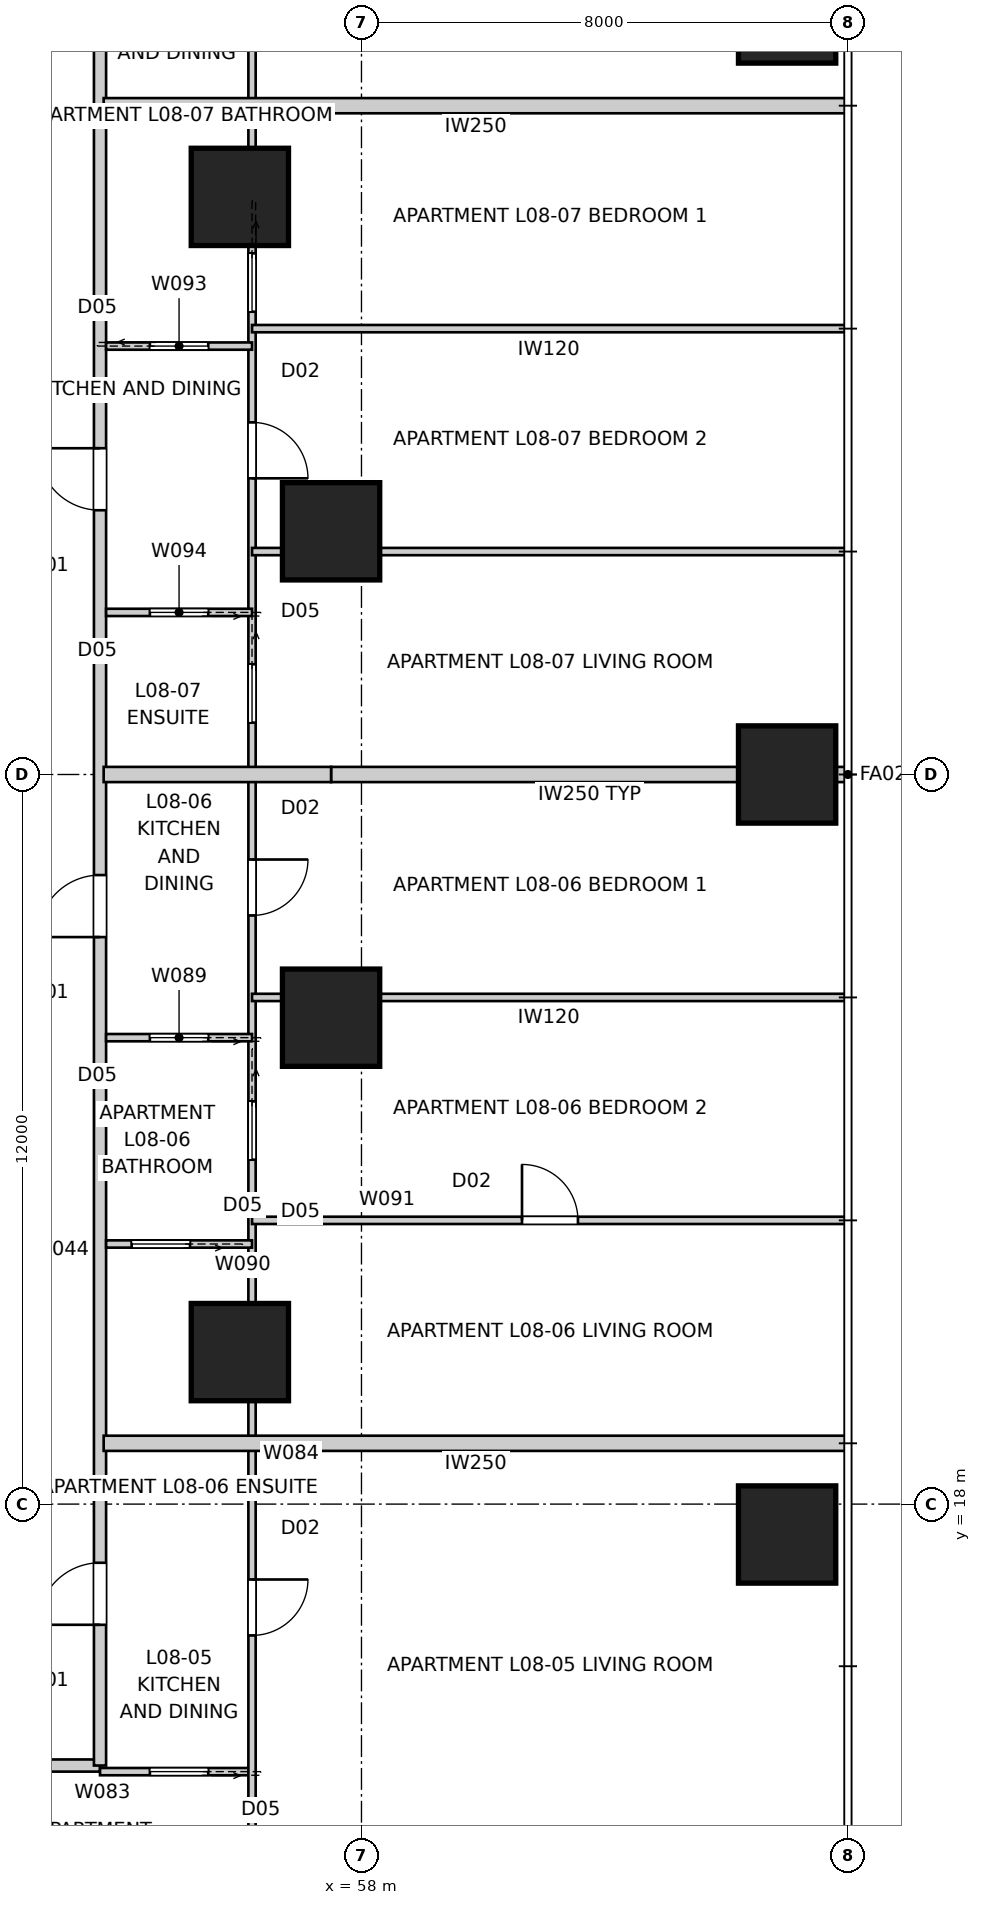
"""IFC4 building model, lengths in metres.
Left out: names, types, materials, properties, quantities, classifications, styles, units other than length and angle.
Written with IfcOpenShell. Run it as: python <this file> out.ifc"""

import sys

from ifc_helpers import new_model, si_unit, direction, frame, frame_2d, origin, origin_2d, place, context, subcontext, project, spatial, rectangle, extrude, element, fill, save


model = new_model("IFC4")
c1 = context("Model", 3, precision=1e-05, world=origin(), true_north=direction((0.0, 1.0)))
c2 = subcontext(c1, "Body", "Model", "MODEL_VIEW")
j1 = project(units=[si_unit("LENGTHUNIT", "METRE"), si_unit("PLANEANGLEUNIT", "RADIAN")], contexts=[c1])
p1 = place(None, origin())
s1 = spatial("IfcSite", under=j1, at=p1, CompositionType="ELEMENT")
p2 = place(p1, origin())
s2 = spatial("IfcBuilding", under=s1, at=p2, CompositionType="ELEMENT")
p3 = place(p2, frame((0.0, 0.0, 32.0)))
s3 = spatial("IfcBuildingStorey", under=s2, at=p3, CompositionType="ELEMENT", Elevation=32.0)
for number, where, z_axis, x_axis in (
    (1, (65.0, 17.5, 0.0), (0.0, 0.0, 1.0), (1.0, 0.0, 0.0)),
    (2, (65.0, 30.0, 0.0), (0.0, 0.0, 1.0), (1.0, 0.0, 0.0)),
    (3, (65.0, 42.5, 0.0), (0.0, 0.0, 1.0), (1.0, 0.0, 0.0)),
    (4, (57.5, 26.0, 0.0), (0.0, 0.0, 1.0), (1.0, 0.0, 0.0)),
    (5, (57.5, 34.0, 0.0), (0.0, 0.0, 1.0), (1.0, 0.0, 0.0)),
    (6, (56.0, 39.5, 0.0), (0.0, 0.0, 1.0), (1.0, 0.0, 0.0)),
    (7, (56.0, 20.5, 0.0), (0.0, 0.0, 1.0), (1.0, 0.0, 0.0)),
):
    element("IfcColumn", number, at=place(p3, frame(where, z_axis=z_axis, x_axis=x_axis)), inside=s3, PredefinedType="COLUMN", context=c2, shape_type="SweptSolid", body=[
        extrude(rectangle(XDim=1.6, YDim=1.6, at=origin_2d()), origin(), (0.0, 0.0, 1.0), 3.4),
    ])
p4 = place(p3, frame((49.242, 13.7, 0.0), z_axis=(0.0, 0.0, 1.0), x_axis=(1.0, 0.0, 0.0)))
e8 = element("IfcWall", 8, at=p4, inside=s3, PredefinedType="PARTITIONING", context=c2, shape_type="SweptSolid", body=[
    extrude(rectangle(XDim=4.458, YDim=0.2, at=frame_2d((2.229, 0.0))), origin(), (0.0, 0.0, 1.0), 3.25),
])
p5 = place(p3, frame((53.7, 13.7, 0.0), z_axis=(0.0, 0.0, 1.0), x_axis=(0.0, 1.0, 0.0)))
e9 = element("IfcWall", 9, at=p5, inside=s3, PredefinedType="PARTITIONING", context=c2, shape_type="SweptSolid", body=[
    extrude(rectangle(XDim=32.6, YDim=0.2, at=frame_2d((16.3, 0.0))), origin(), (0.0, 0.0, 1.0), 3.25),
])
p6 = place(p5, frame((2.315, 0.0, 0.0)))
e10 = element("IfcOpeningElement", 10, at=p6, cuts=e9, PredefinedType="OPENING", context=c2, shape_type="SweptSolid", body=[
    extrude(rectangle(XDim=1.02, YDim=2.34, at=frame_2d((0.51, 1.17))), frame((0.0, 0.11, 0.0), z_axis=(0.0, -1.0, 0.0), x_axis=(1.0, 0.0, 0.0)), (0.0, 0.0, 1.0), 0.22),
])
p7 = place(p5, frame((29.265, 0.0, 0.0)))
e11 = element("IfcOpeningElement", 11, at=p7, cuts=e9, PredefinedType="OPENING", context=c2, shape_type="SweptSolid", body=[
    extrude(rectangle(XDim=1.02, YDim=2.34, at=frame_2d((0.51, 1.17))), frame((0.0, 0.11, 0.0), z_axis=(0.0, -1.0, 0.0), x_axis=(1.0, 0.0, 0.0)), (0.0, 0.0, 1.0), 0.22),
])
p8 = place(p5, frame((20.646, 0.0, 0.0)))
e12 = element("IfcOpeningElement", 12, at=p8, cuts=e9, PredefinedType="OPENING", context=c2, shape_type="SweptSolid", body=[
    extrude(rectangle(XDim=1.02, YDim=2.34, at=frame_2d((0.51, 1.17))), frame((0.0, 0.11, 0.0), z_axis=(0.0, -1.0, 0.0), x_axis=(1.0, 0.0, 0.0)), (0.0, 0.0, 1.0), 0.22),
])
p9 = place(p5, frame((13.626, 0.0, 0.0)))
e13 = element("IfcOpeningElement", 13, at=p9, cuts=e9, PredefinedType="OPENING", context=c2, shape_type="SweptSolid", body=[
    extrude(rectangle(XDim=1.02, YDim=2.34, at=frame_2d((0.51, 1.17))), frame((0.0, 0.11, 0.0), z_axis=(0.0, -1.0, 0.0), x_axis=(1.0, 0.0, 0.0)), (0.0, 0.0, 1.0), 0.22),
])
for number, where, z_axis, x_axis in (
    (14, (66.0, 19.0, 0.0), (0.0, 0.0, 1.0), (-1.0, 0.0, 0.0)),
    (15, (66.0, 41.0, 0.0), (0.0, 0.0, 1.0), (-1.0, 0.0, 0.0)),
):
    element("IfcWall", number, at=place(p3, frame(where, z_axis=z_axis, x_axis=x_axis)), inside=s3, PredefinedType="PARTITIONING", context=c2, shape_type="SweptSolid", body=[
        extrude(rectangle(XDim=12.24, YDim=0.25, at=frame_2d((6.12, 0.0))), origin(), (0.0, 0.0, 1.0), 3.25),
    ])
p10 = place(p3, frame((66.0, 30.0, 0.0), z_axis=(0.0, 0.0, 1.0), x_axis=(-1.0, 0.0, 0.0)))
e16 = element("IfcWall", 16, at=p10, inside=s3, PredefinedType="PARTITIONING", context=c2, shape_type="SweptSolid", body=[
    extrude(rectangle(XDim=8.5, YDim=0.25, at=frame_2d((4.25, 0.0))), origin(), (0.0, 0.0, 1.0), 3.25),
])
p11 = place(p3, frame((57.5, 30.0, 0.0), z_axis=(0.0, 0.0, 1.0), x_axis=(-1.0, 0.0, 0.0)))
e17 = element("IfcWall", 17, at=p11, inside=s3, PredefinedType="PARTITIONING", context=c2, shape_type="SweptSolid", body=[
    extrude(rectangle(XDim=3.74, YDim=0.25, at=frame_2d((1.87, 0.0))), origin(), (0.0, 0.0, 1.0), 2.796),
])
p12 = place(p3, frame((56.2, 13.6, 0.0), z_axis=(0.0, 0.0, 1.0), x_axis=(-1.0, 0.0, 0.0)))
e18 = element("IfcWall", 18, at=p12, inside=s3, PredefinedType="PARTITIONING", context=c2, shape_type="SweptSolid", body=[
    extrude(rectangle(XDim=2.5, YDim=0.12, at=frame_2d((1.25, 0.0))), origin(), (0.0, 0.0, 1.0), 3.25),
])
p13 = place(p12, frame((0.72, 0.0, 0.0)))
e19 = element("IfcOpeningElement", 19, at=p13, cuts=e18, PredefinedType="OPENING", context=c2, shape_type="SweptSolid", body=[
    extrude(rectangle(XDim=0.96, YDim=2.1, at=frame_2d((0.48, 1.05))), frame((0.0, 0.07, 0.0), z_axis=(0.0, -1.0, 0.0), x_axis=(1.0, 0.0, 0.0)), (0.0, 0.0, 1.0), 0.14),
])
p14 = place(p3, frame((56.2, 48.333, 0.0), z_axis=(0.0, 0.0, 1.0), x_axis=(0.0, -1.0, 0.0)))
e20 = element("IfcWall", 20, at=p14, inside=s3, PredefinedType="PARTITIONING", context=c2, shape_type="SweptSolid", body=[
    extrude(rectangle(XDim=36.667, YDim=0.12, at=frame_2d((18.333, 0.0))), origin(), (0.0, 0.0, 1.0), 2.55),
])
p15 = place(p14, frame((31.573, 0.0, 0.0)))
e21 = element("IfcOpeningElement", 21, at=p15, cuts=e20, PredefinedType="OPENING", context=c2, shape_type="SweptSolid", body=[
    extrude(rectangle(XDim=0.92, YDim=2.34, at=frame_2d((0.46, 1.17))), frame((0.0, 0.07, 0.0), z_axis=(0.0, -1.0, 0.0), x_axis=(1.0, 0.0, 0.0)), (0.0, 0.0, 1.0), 0.14),
])
p16 = place(p14, frame((3.207, 0.0, 0.0)))
e22 = element("IfcOpeningElement", 22, at=p16, cuts=e20, PredefinedType="OPENING", context=c2, shape_type="SweptSolid", body=[
    extrude(rectangle(XDim=0.92, YDim=2.34, at=frame_2d((0.46, 1.17))), frame((0.0, 0.07, 0.0), z_axis=(0.0, -1.0, 0.0), x_axis=(1.0, 0.0, 0.0)), (0.0, 0.0, 1.0), 0.14),
])
p17 = place(p14, frame((12.542, 0.0, 0.0)))
e23 = element("IfcOpeningElement", 23, at=p17, cuts=e20, PredefinedType="OPENING", context=c2, shape_type="SweptSolid", body=[
    extrude(rectangle(XDim=0.92, YDim=2.34, at=frame_2d((0.46, 1.17))), frame((0.0, 0.07, 0.0), z_axis=(0.0, -1.0, 0.0), x_axis=(1.0, 0.0, 0.0)), (0.0, 0.0, 1.0), 0.14),
])
p18 = place(p14, frame((19.732, 0.0, 0.0)))
e24 = element("IfcOpeningElement", 24, at=p18, cuts=e20, PredefinedType="OPENING", context=c2, shape_type="SweptSolid", body=[
    extrude(rectangle(XDim=0.92, YDim=2.34, at=frame_2d((0.46, 1.17))), frame((0.0, 0.07, 0.0), z_axis=(0.0, -1.0, 0.0), x_axis=(1.0, 0.0, 0.0)), (0.0, 0.0, 1.0), 0.14),
])
p19 = place(p14, frame((9.762, 0.0, 0.0)))
e25 = element("IfcOpeningElement", 25, at=p19, cuts=e20, PredefinedType="OPENING", context=c2, shape_type="SweptSolid", body=[
    extrude(rectangle(XDim=0.96, YDim=2.1, at=frame_2d((0.48, 1.05))), frame((0.0, 0.07, 0.0), z_axis=(0.0, -1.0, 0.0), x_axis=(1.0, 0.0, 0.0)), (0.0, 0.0, 1.0), 0.14),
])
p20 = place(p14, frame((16.52, 0.0, 0.0)))
e26 = element("IfcOpeningElement", 26, at=p20, cuts=e20, PredefinedType="OPENING", context=c2, shape_type="SweptSolid", body=[
    extrude(rectangle(XDim=0.96, YDim=2.1, at=frame_2d((0.48, 1.05))), frame((0.0, 0.07, 0.0), z_axis=(0.0, -1.0, 0.0), x_axis=(1.0, 0.0, 0.0)), (0.0, 0.0, 1.0), 0.14),
])
p21 = place(p14, frame((23.709, 0.0, 0.0)))
e27 = element("IfcOpeningElement", 27, at=p21, cuts=e20, PredefinedType="OPENING", context=c2, shape_type="SweptSolid", body=[
    extrude(rectangle(XDim=0.96, YDim=2.1, at=frame_2d((0.48, 1.05))), frame((0.0, 0.07, 0.0), z_axis=(0.0, -1.0, 0.0), x_axis=(1.0, 0.0, 0.0)), (0.0, 0.0, 1.0), 0.14),
])
p22 = place(p3, frame((56.2, 25.672, 0.0), z_axis=(0.0, 0.0, 1.0), x_axis=(-1.0, 0.0, 0.0)))
e28 = element("IfcWall", 28, at=p22, inside=s3, PredefinedType="PARTITIONING", context=c2, shape_type="SweptSolid", body=[
    extrude(rectangle(XDim=2.4, YDim=0.12, at=frame_2d((1.2, 0.0))), origin(), (0.0, 0.0, 1.0), 3.25),
])
p23 = place(p22, frame((0.72, 0.0, 0.0)))
e29 = element("IfcOpeningElement", 29, at=p23, cuts=e28, PredefinedType="OPENING", context=c2, shape_type="SweptSolid", body=[
    extrude(rectangle(XDim=0.96, YDim=2.1, at=frame_2d((0.48, 1.05))), frame((0.0, 0.07, 0.0), z_axis=(0.0, -1.0, 0.0), x_axis=(1.0, 0.0, 0.0)), (0.0, 0.0, 1.0), 0.14),
])
p24 = place(p3, frame((56.2, 22.278, 0.0), z_axis=(0.0, 0.0, 1.0), x_axis=(-1.0, 0.0, 0.0)))
e30 = element("IfcWall", 30, at=p24, inside=s3, PredefinedType="PARTITIONING", context=c2, shape_type="SweptSolid", body=[
    extrude(rectangle(XDim=2.4, YDim=0.12, at=frame_2d((1.2, 0.0))), origin(), (0.0, 0.0, 1.0), 3.25),
])
p25 = place(p24, frame((1.02, 0.0, 0.0)))
e31 = element("IfcOpeningElement", 31, at=p25, cuts=e30, PredefinedType="OPENING", context=c2, shape_type="SweptSolid", body=[
    extrude(rectangle(XDim=0.96, YDim=2.1, at=frame_2d((0.48, 1.05))), frame((0.0, 0.07, 0.0), z_axis=(0.0, -1.0, 0.0), x_axis=(1.0, 0.0, 0.0)), (0.0, 0.0, 1.0), 0.14),
])
p26 = place(p3, frame((56.2, 22.667, 0.0), z_axis=(0.0, 0.0, 1.0), x_axis=(1.0, 0.0, 0.0)))
e32 = element("IfcWall", 32, at=p26, inside=s3, PredefinedType="PARTITIONING", context=c2, shape_type="SweptSolid", body=[
    extrude(rectangle(XDim=9.76, YDim=0.12, at=frame_2d((4.88, 0.0))), origin(), (0.0, 0.0, 1.0), 3.25),
])
p27 = place(p26, frame((4.44, 0.0, 0.0)))
e33 = element("IfcOpeningElement", 33, at=p27, cuts=e32, PredefinedType="OPENING", context=c2, shape_type="SweptSolid", body=[
    extrude(rectangle(XDim=0.92, YDim=2.34, at=frame_2d((0.46, 1.17))), frame((0.0, 0.07, 0.0), z_axis=(0.0, -1.0, 0.0), x_axis=(1.0, 0.0, 0.0)), (0.0, 0.0, 1.0), 0.14),
])
p28 = place(p3, frame((65.96, 26.333, 0.0), z_axis=(0.0, 0.0, 1.0), x_axis=(-1.0, 0.0, 0.0)))
e34 = element("IfcWall", 34, at=p28, inside=s3, PredefinedType="PARTITIONING", context=c2, shape_type="SweptSolid", body=[
    extrude(rectangle(XDim=9.76, YDim=0.12, at=frame_2d((4.88, 0.0))), origin(), (0.0, 0.0, 1.0), 3.25),
])
p29 = place(p3, frame((53.8, 37.046, 0.0), z_axis=(0.0, 0.0, 1.0), x_axis=(1.0, 0.0, 0.0)))
e35 = element("IfcWall", 35, at=p29, inside=s3, PredefinedType="PARTITIONING", context=c2, shape_type="SweptSolid", body=[
    extrude(rectangle(XDim=2.4, YDim=0.12, at=frame_2d((1.2, 0.0))), origin(), (0.0, 0.0, 1.0), 3.25),
])
p30 = place(p29, frame((0.72, 0.0, 0.0)))
e36 = element("IfcOpeningElement", 36, at=p30, cuts=e35, PredefinedType="OPENING", context=c2, shape_type="SweptSolid", body=[
    extrude(rectangle(XDim=0.96, YDim=2.1, at=frame_2d((0.48, 1.05))), frame((0.0, 0.07, 0.0), z_axis=(0.0, -1.0, 0.0), x_axis=(1.0, 0.0, 0.0)), (0.0, 0.0, 1.0), 0.14),
])
p31 = place(p3, frame((56.2, 32.666, 0.0), z_axis=(0.0, 0.0, 1.0), x_axis=(-1.0, 0.0, 0.0)))
e37 = element("IfcWall", 37, at=p31, inside=s3, PredefinedType="PARTITIONING", context=c2, shape_type="SweptSolid", body=[
    extrude(rectangle(XDim=2.4, YDim=0.12, at=frame_2d((1.2, 0.0))), origin(), (0.0, 0.0, 1.0), 3.25),
])
p32 = place(p31, frame((0.72, 0.0, 0.0)))
e38 = element("IfcOpeningElement", 38, at=p32, cuts=e37, PredefinedType="OPENING", context=c2, shape_type="SweptSolid", body=[
    extrude(rectangle(XDim=0.96, YDim=2.1, at=frame_2d((0.48, 1.05))), frame((0.0, 0.07, 0.0), z_axis=(0.0, -1.0, 0.0), x_axis=(1.0, 0.0, 0.0)), (0.0, 0.0, 1.0), 0.14),
])
for number, where, z_axis, x_axis in (
    (39, (56.2, 33.667, 0.0), (0.0, 0.0, 1.0), (1.0, 0.0, 0.0)),
    (40, (65.96, 37.333, 0.0), (0.0, 0.0, 1.0), (-1.0, 0.0, 0.0)),
):
    element("IfcWall", number, at=place(p3, frame(where, z_axis=z_axis, x_axis=x_axis)), inside=s3, PredefinedType="PARTITIONING", context=c2, shape_type="SweptSolid", body=[
        extrude(rectangle(XDim=9.76, YDim=0.12, at=frame_2d((4.88, 0.0))), origin(), (0.0, 0.0, 1.0), 3.25),
    ])
p33 = place(p6, origin())
e41 = element("IfcDoor", 41, at=p33, inside=s3, OperationType="SINGLE_SWING_LEFT", PredefinedType="DOOR", context=c2, shape_type="SweptSolid", body=[
    extrude(rectangle(XDim=1.02, YDim=2.34, at=frame_2d((0.51, 1.17))), frame((0.0, 0.025, 0.0), z_axis=(0.0, -1.0, 0.0), x_axis=(1.0, 0.0, 0.0)), (0.0, 0.0, 1.0), 0.05),
])
fill(e10, e41)
p34 = place(p8, origin())
e42 = element("IfcDoor", 42, at=p34, inside=s3, OperationType="SINGLE_SWING_RIGHT", PredefinedType="DOOR", context=c2, shape_type="SweptSolid", body=[
    extrude(rectangle(XDim=1.02, YDim=2.34, at=frame_2d((0.51, 1.17))), frame((0.0, 0.025, 0.0), z_axis=(0.0, -1.0, 0.0), x_axis=(1.0, 0.0, 0.0)), (0.0, 0.0, 1.0), 0.05),
])
fill(e12, e42)
p35 = place(p9, origin())
e43 = element("IfcDoor", 43, at=p35, inside=s3, OperationType="SINGLE_SWING_LEFT", PredefinedType="DOOR", context=c2, shape_type="SweptSolid", body=[
    extrude(rectangle(XDim=1.02, YDim=2.34, at=frame_2d((0.51, 1.17))), frame((0.0, 0.025, 0.0), z_axis=(0.0, -1.0, 0.0), x_axis=(1.0, 0.0, 0.0)), (0.0, 0.0, 1.0), 0.05),
])
fill(e13, e43)
p36 = place(p15, origin())
e44 = element("IfcDoor", 44, at=p36, inside=s3, OperationType="SINGLE_SWING_LEFT", PredefinedType="DOOR", context=c2, shape_type="SweptSolid", body=[
    extrude(rectangle(XDim=0.92, YDim=2.34, at=frame_2d((0.46, 1.17))), frame((0.0, 0.025, 0.0), z_axis=(0.0, -1.0, 0.0), x_axis=(1.0, 0.0, 0.0)), (0.0, 0.0, 1.0), 0.05),
])
fill(e21, e44)
p37 = place(p13, origin())
e45 = element("IfcDoor", 45, at=p37, inside=s3, OperationType="SLIDING_TO_LEFT", PredefinedType="DOOR", context=c2, shape_type="SweptSolid", body=[
    extrude(rectangle(XDim=0.96, YDim=2.1, at=frame_2d((0.48, 1.05))), frame((0.0, 0.025, 0.0), z_axis=(0.0, -1.0, 0.0), x_axis=(1.0, 0.0, 0.0)), (0.0, 0.0, 1.0), 0.05),
])
fill(e19, e45)
p38 = place(p17, origin())
e46 = element("IfcDoor", 46, at=p38, inside=s3, OperationType="SINGLE_SWING_RIGHT", PredefinedType="DOOR", context=c2, shape_type="SweptSolid", body=[
    extrude(rectangle(XDim=0.92, YDim=2.34, at=frame_2d((0.46, 1.17))), frame((0.0, 0.025, 0.0), z_axis=(0.0, -1.0, 0.0), x_axis=(1.0, 0.0, 0.0)), (0.0, 0.0, 1.0), 0.05),
])
fill(e23, e46)
p39 = place(p30, origin())
e47 = element("IfcDoor", 47, at=p39, inside=s3, OperationType="SLIDING_TO_LEFT", PredefinedType="DOOR", context=c2, shape_type="SweptSolid", body=[
    extrude(rectangle(XDim=0.96, YDim=2.1, at=frame_2d((0.48, 1.05))), frame((0.0, 0.025, 0.0), z_axis=(0.0, -1.0, 0.0), x_axis=(1.0, 0.0, 0.0)), (0.0, 0.0, 1.0), 0.05),
])
fill(e36, e47)
p40 = place(p32, origin())
e48 = element("IfcDoor", 48, at=p40, inside=s3, OperationType="SLIDING_TO_LEFT", PredefinedType="DOOR", context=c2, shape_type="SweptSolid", body=[
    extrude(rectangle(XDim=0.96, YDim=2.1, at=frame_2d((0.48, 1.05))), frame((0.0, 0.025, 0.0), z_axis=(0.0, -1.0, 0.0), x_axis=(1.0, 0.0, 0.0)), (0.0, 0.0, 1.0), 0.05),
])
fill(e38, e48)
p41 = place(p18, origin())
e49 = element("IfcDoor", 49, at=p41, inside=s3, OperationType="SINGLE_SWING_LEFT", PredefinedType="DOOR", context=c2, shape_type="SweptSolid", body=[
    extrude(rectangle(XDim=0.92, YDim=2.34, at=frame_2d((0.46, 1.17))), frame((0.0, 0.025, 0.0), z_axis=(0.0, -1.0, 0.0), x_axis=(1.0, 0.0, 0.0)), (0.0, 0.0, 1.0), 0.05),
])
fill(e24, e49)
p42 = place(p23, origin())
e50 = element("IfcDoor", 50, at=p42, inside=s3, OperationType="SLIDING_TO_LEFT", PredefinedType="DOOR", context=c2, shape_type="SweptSolid", body=[
    extrude(rectangle(XDim=0.96, YDim=2.1, at=frame_2d((0.48, 1.05))), frame((0.0, 0.025, 0.0), z_axis=(0.0, -1.0, 0.0), x_axis=(1.0, 0.0, 0.0)), (0.0, 0.0, 1.0), 0.05),
])
fill(e29, e50)
p43 = place(p19, origin())
e51 = element("IfcDoor", 51, at=p43, inside=s3, OperationType="SLIDING_TO_LEFT", PredefinedType="DOOR", context=c2, shape_type="SweptSolid", body=[
    extrude(rectangle(XDim=0.96, YDim=2.1, at=frame_2d((0.48, 1.05))), frame((0.0, 0.025, 0.0), z_axis=(0.0, -1.0, 0.0), x_axis=(1.0, 0.0, 0.0)), (0.0, 0.0, 1.0), 0.05),
])
fill(e25, e51)
p44 = place(p20, origin())
e52 = element("IfcDoor", 52, at=p44, inside=s3, OperationType="SLIDING_TO_LEFT", PredefinedType="DOOR", context=c2, shape_type="SweptSolid", body=[
    extrude(rectangle(XDim=0.96, YDim=2.1, at=frame_2d((0.48, 1.05))), frame((0.0, 0.025, 0.0), z_axis=(0.0, -1.0, 0.0), x_axis=(1.0, 0.0, 0.0)), (0.0, 0.0, 1.0), 0.05),
])
fill(e26, e52)
p45 = place(p21, origin())
e53 = element("IfcDoor", 53, at=p45, inside=s3, OperationType="SLIDING_TO_LEFT", PredefinedType="DOOR", context=c2, shape_type="SweptSolid", body=[
    extrude(rectangle(XDim=0.96, YDim=2.1, at=frame_2d((0.48, 1.05))), frame((0.0, 0.025, 0.0), z_axis=(0.0, -1.0, 0.0), x_axis=(1.0, 0.0, 0.0)), (0.0, 0.0, 1.0), 0.05),
])
fill(e27, e53)
p46 = place(p25, origin())
e54 = element("IfcDoor", 54, at=p46, inside=s3, OperationType="SLIDING_TO_LEFT", PredefinedType="DOOR", context=c2, shape_type="SweptSolid", body=[
    extrude(rectangle(XDim=0.96, YDim=2.1, at=frame_2d((0.48, 1.05))), frame((0.0, 0.025, 0.0), z_axis=(0.0, -1.0, 0.0), x_axis=(1.0, 0.0, 0.0)), (0.0, 0.0, 1.0), 0.05),
])
fill(e31, e54)
p47 = place(p27, origin())
e55 = element("IfcDoor", 55, at=p47, inside=s3, OperationType="SINGLE_SWING_LEFT", PredefinedType="DOOR", context=c2, shape_type="SweptSolid", body=[
    extrude(rectangle(XDim=0.92, YDim=2.34, at=frame_2d((0.46, 1.17))), frame((0.0, 0.025, 0.0), z_axis=(0.0, -1.0, 0.0), x_axis=(1.0, 0.0, 0.0)), (0.0, 0.0, 1.0), 0.05),
])
fill(e33, e55)
save(model, sys.argv[1])
